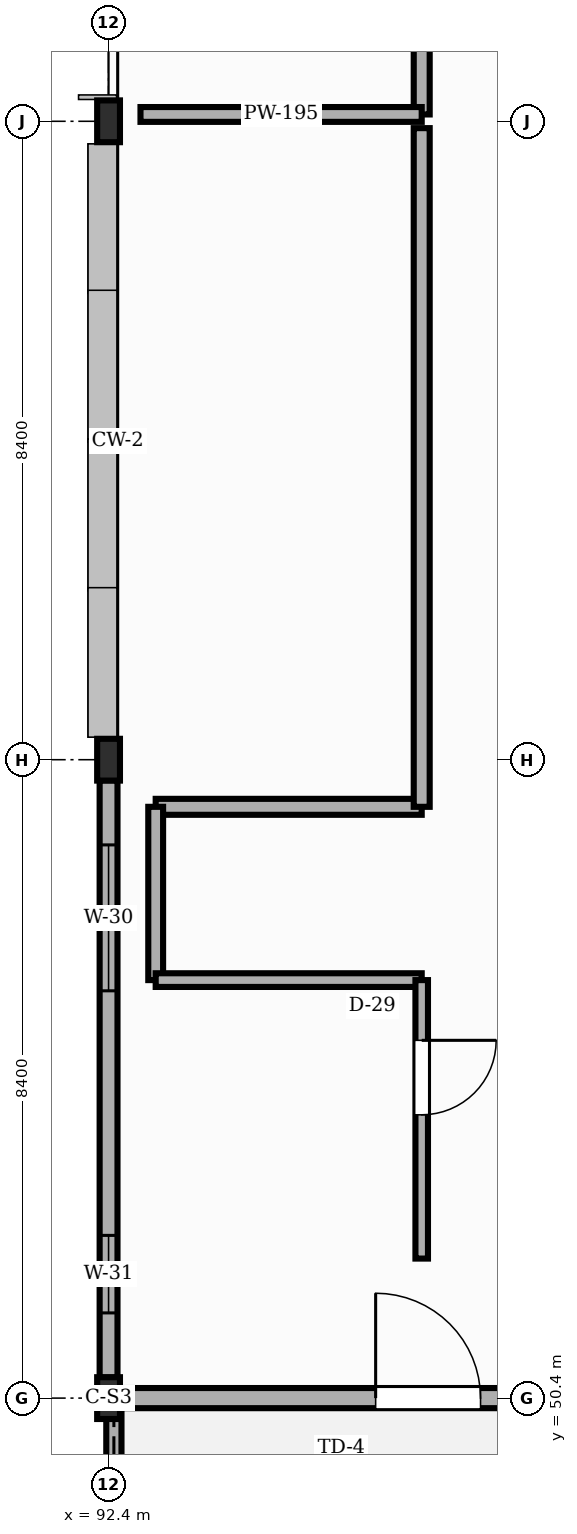
"""IFC4 building model, lengths in metres.
Left out: names, types, materials, properties, quantities, classifications, styles, units other than length and angle.
Written with IfcOpenShell. Run it as: python <this file> out.ifc"""

import sys

from ifc_helpers import new_model, si_unit, direction, frame, frame_2d, origin, origin_2d, place, context, subcontext, project, spatial, rectangle, i_section, extrude, element, fill, save


model = new_model("IFC4")
c1 = context("Model", 3, precision=1e-05, world=origin(), true_north=direction((0.0, 1.0)))
c2 = subcontext(c1, "Body", "Model", "MODEL_VIEW")
j1 = project(units=[si_unit("LENGTHUNIT", "METRE"), si_unit("PLANEANGLEUNIT", "RADIAN")], contexts=[c1])
p1 = place(None, origin())
s1 = spatial("IfcSite", under=j1, at=p1, CompositionType="ELEMENT")
p2 = place(p1, origin())
s2 = spatial("IfcBuilding", under=s1, at=p2, CompositionType="ELEMENT")
p3 = place(p2, frame((0.0, 0.0, 13.95)))
s3 = spatial("IfcBuildingStorey", under=s2, at=p3, CompositionType="ELEMENT", Elevation=13.95)
for number, where, z_axis, x_axis in (
    (1, (92.4, 50.4, 0.0), (0.0, 0.0, 1.0), (1.0, 0.0, 0.0)),
    (2, (92.4, 58.8, 0.0), (0.0, 0.0, 1.0), (1.0, 0.0, 0.0)),
    (3, (92.4, 67.2, 0.0), (0.0, 0.0, 1.0), (1.0, 0.0, 0.0)),
):
    element("IfcColumn", number, at=place(p3, frame(where, z_axis=z_axis, x_axis=x_axis)), inside=s3, PredefinedType="COLUMN", context=c2, shape_type="SweptSolid", body=[
        extrude(i_section(OverallWidth=0.3, OverallDepth=0.55, WebThickness=0.015, FlangeThickness=0.029, FilletRadius=0.027, at=origin_2d()), origin(), (0.0, 0.0, 1.0), 4.05),
    ])
p4 = place(p3, frame((92.4, 58.529, 0.0), z_axis=(0.0, 0.0, 1.0), x_axis=(0.0, -1.0, 0.0)))
e4 = element("IfcWall", 4, at=p4, inside=s3, PredefinedType="STANDARD", context=c2, shape_type="SweptSolid", body=[
    extrude(rectangle(XDim=7.858, YDim=0.235, at=frame_2d((3.929, 0.0))), origin(), (0.0, 0.0, 1.0), 3.562),
])
p5 = place(p4, frame((0.85, 0.0, 0.9)))
e5 = element("IfcOpeningElement", 5, at=p5, cuts=e4, PredefinedType="OPENING", context=c2, shape_type="SweptSolid", body=[
    extrude(rectangle(XDim=1.92, YDim=1.45, at=frame_2d((0.96, 0.725))), frame((0.0, 0.127, 0.0), z_axis=(0.0, -1.0, 0.0), x_axis=(1.0, 0.0, 0.0)), (0.0, 0.0, 1.0), 0.255),
])
p6 = place(p4, frame((5.988, 0.0, 0.9)))
e6 = element("IfcOpeningElement", 6, at=p6, cuts=e4, PredefinedType="OPENING", context=c2, shape_type="SweptSolid", body=[
    extrude(rectangle(XDim=1.02, YDim=1.65, at=frame_2d((0.51, 0.825))), frame((0.0, 0.127, 0.0), z_axis=(0.0, -1.0, 0.0), x_axis=(1.0, 0.0, 0.0)), (0.0, 0.0, 1.0), 0.255),
])
p7 = place(p3, frame((92.408, 50.4, 0.0), z_axis=(0.0, 0.0, 1.0), x_axis=(1.0, 0.0, 0.0)))
e7 = element("IfcWall", 7, at=p7, inside=s3, PredefinedType="STANDARD", context=c2, shape_type="SweptSolid", body=[
    extrude(rectangle(XDim=8.457, YDim=0.265, at=frame_2d((4.229, 0.0))), origin(), (0.0, 0.0, 1.0), 2.832),
])
p8 = place(p7, frame((3.506, 0.0, 0.0)))
e8 = element("IfcOpeningElement", 8, at=p8, cuts=e7, PredefinedType="OPENING", context=c2, shape_type="SweptSolid", body=[
    extrude(rectangle(XDim=1.38, YDim=2.18, at=frame_2d((0.69, 1.09))), frame((0.0, 0.142, 0.0), z_axis=(0.0, -1.0, 0.0), x_axis=(1.0, 0.0, 0.0)), (0.0, 0.0, 1.0), 0.285),
])
p9 = place(p3, frame((92.47, 50.26, 0.0), z_axis=(0.0, 0.0, 1.0), x_axis=(0.0, -1.0, 0.0)))
e9 = element("IfcWall", 9, at=p9, inside=s3, PredefinedType="PARAPET", context=c2, shape_type="SweptSolid", body=[
    extrude(rectangle(XDim=5.0, YDim=0.2, at=frame_2d((2.5, 0.0))), origin(), (0.0, 0.0, 1.0), 0.22),
])
p10 = place(p3, frame((96.52, 77.68, -0.004), z_axis=(0.0, 0.0, 1.0), x_axis=(0.0, -1.0, 0.0)))
e10 = element("IfcWall", 10, at=p10, inside=s3, PredefinedType="STANDARD", context=c2, shape_type="SweptSolid", body=[
    extrude(rectangle(XDim=10.39, YDim=0.21, at=frame_2d((5.195, 0.0))), origin(), (0.0, 0.0, 1.0), 3.854),
])
p11 = place(p3, frame((96.52, 67.29, -0.004), z_axis=(0.0, 0.0, 1.0), x_axis=(-1.0, 0.0, 0.0)))
e11 = element("IfcWall", 11, at=p11, inside=s3, PredefinedType="STANDARD", context=c2, shape_type="SweptSolid", body=[
    extrude(rectangle(XDim=3.7, YDim=0.195, at=frame_2d((1.85, 0.0))), origin(), (0.0, 0.0, 1.0), 2.836),
])
p12 = place(p3, frame((96.52, 58.18, -0.004), z_axis=(0.0, 0.0, 1.0), x_axis=(-1.0, 0.0, 0.0)))
e12 = element("IfcWall", 12, at=p12, inside=s3, PredefinedType="STANDARD", context=c2, shape_type="SweptSolid", body=[
    extrude(rectangle(XDim=3.5, YDim=0.21, at=frame_2d((1.75, 0.0))), origin(), (0.0, 0.0, 1.0), 3.854),
])
p13 = place(p3, frame((93.02, 58.18, -0.004), z_axis=(0.0, 0.0, 1.0), x_axis=(0.0, -1.0, 0.0)))
e13 = element("IfcWall", 13, at=p13, inside=s3, PredefinedType="STANDARD", context=c2, shape_type="SweptSolid", body=[
    extrude(rectangle(XDim=2.28, YDim=0.195, at=frame_2d((1.14, 0.0))), origin(), (0.0, 0.0, 1.0), 3.854),
])
p14 = place(p3, frame((93.02, 55.9, -0.004), z_axis=(0.0, 0.0, 1.0), x_axis=(1.0, 0.0, 0.0)))
e14 = element("IfcWall", 14, at=p14, inside=s3, PredefinedType="STANDARD", context=c2, shape_type="SweptSolid", body=[
    extrude(rectangle(XDim=3.5, YDim=0.18, at=frame_2d((1.75, 0.0))), origin(), (0.0, 0.0, 1.0), 3.854),
])
p15 = place(p3, frame((96.52, 55.9, -0.004), z_axis=(0.0, 0.0, 1.0), x_axis=(0.0, -1.0, 0.0)))
e15 = element("IfcWall", 15, at=p15, inside=s3, PredefinedType="STANDARD", context=c2, shape_type="SweptSolid", body=[
    extrude(rectangle(XDim=3.664, YDim=0.165, at=frame_2d((1.832, 0.0))), origin(), (0.0, 0.0, 1.0), 3.854),
])
p16 = place(p15, frame((0.792, 0.0, 0.0)))
e16 = element("IfcOpeningElement", 16, at=p16, cuts=e15, PredefinedType="OPENING", context=c2, shape_type="SweptSolid", body=[
    extrude(rectangle(XDim=0.98, YDim=2.3, at=frame_2d((0.49, 1.15))), frame((0.0, 0.093, 0.0), z_axis=(0.0, -1.0, 0.0), x_axis=(1.0, 0.0, 0.0)), (0.0, 0.0, 1.0), 0.185),
])
p17 = place(p3, frame((96.52, 67.11, -0.004), z_axis=(0.0, 0.0, 1.0), x_axis=(0.0, -1.0, 0.0)))
e17 = element("IfcWall", 17, at=p17, inside=s3, PredefinedType="STANDARD", context=c2, shape_type="SweptSolid", body=[
    extrude(rectangle(XDim=8.93, YDim=0.21, at=frame_2d((4.465, 0.0))), origin(), (0.0, 0.0, 1.0), 3.854),
])
p18 = place(p5, origin())
e18 = element("IfcWindow", 18, at=p18, inside=s3, PartitioningType="SINGLE_PANEL", PredefinedType="WINDOW", context=c2, shape_type="SweptSolid", body=[
    extrude(rectangle(XDim=1.92, YDim=1.45, at=frame_2d((0.96, 0.725))), frame((0.0, 0.03, 0.0), z_axis=(0.0, -1.0, 0.0), x_axis=(1.0, 0.0, 0.0)), (0.0, 0.0, 1.0), 0.06),
])
fill(e5, e18)
p19 = place(p6, origin())
e19 = element("IfcWindow", 19, at=p19, inside=s3, PartitioningType="SINGLE_PANEL", PredefinedType="WINDOW", context=c2, shape_type="SweptSolid", body=[
    extrude(rectangle(XDim=1.02, YDim=1.65, at=frame_2d((0.51, 0.825))), frame((0.0, 0.03, 0.0), z_axis=(0.0, -1.0, 0.0), x_axis=(1.0, 0.0, 0.0)), (0.0, 0.0, 1.0), 0.06),
])
fill(e6, e19)
p20 = place(p8, origin())
e20 = element("IfcDoor", 20, at=p20, inside=s3, OperationType="SINGLE_SWING_LEFT", PredefinedType="DOOR", context=c2, shape_type="SweptSolid", body=[
    extrude(rectangle(XDim=1.38, YDim=2.18, at=frame_2d((0.69, 1.09))), frame((0.0, 0.025, 0.0), z_axis=(0.0, -1.0, 0.0), x_axis=(1.0, 0.0, 0.0)), (0.0, 0.0, 1.0), 0.05),
])
fill(e8, e20)
p21 = place(p16, origin())
e21 = element("IfcDoor", 21, at=p21, inside=s3, OperationType="SINGLE_SWING_LEFT", PredefinedType="DOOR", context=c2, shape_type="SweptSolid", body=[
    extrude(rectangle(XDim=0.98, YDim=2.3, at=frame_2d((0.49, 1.15))), frame((0.0, 0.025, 0.0), z_axis=(0.0, -1.0, 0.0), x_axis=(1.0, 0.0, 0.0)), (0.0, 0.0, 1.0), 0.05),
])
fill(e16, e21)
save(model, sys.argv[1])
